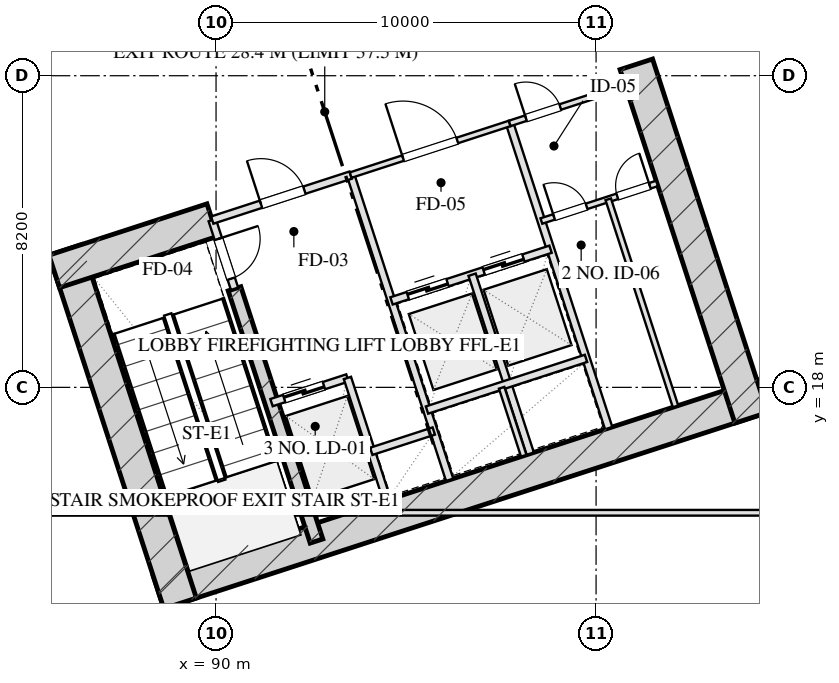
"""IFC4 building model, lengths in metres.
Left out: names, types, materials, properties, quantities, classifications, styles, units other than length and angle.
Written with IfcOpenShell. Run it as: python <this file> out.ifc"""

import sys

from ifc_helpers import new_model, si_unit, direction, frame, frame_2d, origin, place, context, subcontext, project, spatial, rectangle, extrude, element, fill, save


model = new_model("IFC4")
c1 = context("Model", 3, precision=1e-05, world=origin(), true_north=direction((0.0, 1.0)))
c2 = subcontext(c1, "Body", "Model", "MODEL_VIEW")
j1 = project(units=[si_unit("LENGTHUNIT", "METRE"), si_unit("PLANEANGLEUNIT", "RADIAN")], contexts=[c1])
p1 = place(None, origin())
s1 = spatial("IfcSite", under=j1, at=p1, CompositionType="ELEMENT")
p2 = place(p1, origin())
s2 = spatial("IfcBuilding", under=s1, at=p2, CompositionType="ELEMENT")
p3 = place(p2, frame((0.0, 0.0, 6.0)))
s3 = spatial("IfcBuildingStorey", under=s2, at=p3, CompositionType="ELEMENT", Elevation=6.0)
p4 = place(p3, frame((88.487, 12.605, 0.0), z_axis=(0.0, 0.0, 1.0), x_axis=(0.951055016115, 0.309021611416, 0.0)))
e1 = element("IfcWall", 1, at=p4, inside=s3, PredefinedType="SHEAR", context=c2, shape_type="SweptSolid", body=[
    extrude(rectangle(XDim=16.7, YDim=0.9, at=frame_2d((8.35, 0.0))), origin(), (0.0, 0.0, 1.0), 5.5),
])
p5 = place(p3, frame((86.032, 21.618, 0.0), z_axis=(0.0, 0.0, 1.0), x_axis=(0.30901438634, -0.951057363693, 0.0)))
e2 = element("IfcWall", 2, at=p5, inside=s3, PredefinedType="SHEAR", context=c2, shape_type="SweptSolid", body=[
    extrude(rectangle(XDim=9.78, YDim=0.9, at=frame_2d((4.89, 0.0))), origin(), (0.0, 0.0, 1.0), 5.5),
])
p6 = place(p3, frame((101.059, 26.5, 0.0), z_axis=(0.0, 0.0, 1.0), x_axis=(0.309021722829, -0.951054979914, 0.0)))
e3 = element("IfcWall", 3, at=p6, inside=s3, PredefinedType="SHEAR", context=c2, shape_type="SweptSolid", body=[
    extrude(rectangle(XDim=9.78, YDim=0.9, at=frame_2d((4.89, 0.0))), origin(), (0.0, 0.0, 1.0), 5.5),
])
p7 = place(p3, frame((90.486, 20.594, 0.0), z_axis=(0.0, 0.0, 1.0), x_axis=(0.309020428229, -0.951055400562, 0.0)))
e4 = element("IfcWall", 4, at=p7, inside=s3, PredefinedType="SHEAR", context=c2, shape_type="SweptSolid", body=[
    extrude(rectangle(XDim=6.98, YDim=0.35, at=frame_2d((3.49, 0.0))), origin(), (0.0, 0.0, 1.0), 5.5),
])
p8 = place(p3, frame((85.743, 21.051, 0.0), z_axis=(0.0, 0.0, 1.0), x_axis=(0.951063623806, 0.308995118848, 0.0)))
e5 = element("IfcWall", 5, at=p8, inside=s3, PredefinedType="SHEAR", context=c2, shape_type="SweptSolid", body=[
    extrude(rectangle(XDim=4.37, YDim=0.9, at=frame_2d((2.185, 0.0))), origin(), (0.0, 0.0, 1.0), 5.5),
])
p9 = place(p3, frame((89.899, 22.401, 0.0), z_axis=(0.0, 0.0, 1.0), x_axis=(0.308932062672, -0.951084108086, 0.0)))
e6 = element("IfcWall", 6, at=p9, inside=s3, PredefinedType="PARTITIONING", context=c2, shape_type="SweptSolid", body=[
    extrude(rectangle(XDim=1.9, YDim=0.2, at=frame_2d((0.95, 0.0))), origin(), (0.0, 0.0, 1.0), 5.185),
])
p10 = place(p9, frame((0.52, 0.0, 0.0)))
e7 = element("IfcOpeningElement", 7, at=p10, cuts=e6, PredefinedType="OPENING", context=c2, shape_type="SweptSolid", body=[
    extrude(rectangle(XDim=1.1, YDim=2.05, at=frame_2d((0.55, 1.025))), frame((0.0, 0.11, 0.0), z_axis=(0.0, -1.0, 0.0), x_axis=(1.0, 0.0, 0.0)), (0.0, 0.0, 1.0), 0.22),
])
p11 = place(p3, frame((93.542, 23.585, 0.0), z_axis=(0.0, 0.0, 1.0), x_axis=(0.309042196757, -0.951048327176, 0.0)))
e8 = element("IfcWall", 8, at=p11, inside=s3, PredefinedType="PARTITIONING", context=c2, shape_type="SweptSolid", body=[
    extrude(rectangle(XDim=8.43, YDim=0.2, at=frame_2d((4.215, 0.0))), origin(), (0.0, 0.0, 1.0), 5.185),
])
p12 = place(p3, frame((89.899, 22.401, 0.0), z_axis=(0.0, 0.0, 1.0), x_axis=(0.951046716504, 0.309047153403, 0.0)))
e9 = element("IfcWall", 9, at=p12, inside=s3, PredefinedType="PARTITIONING", context=c2, shape_type="SweptSolid", body=[
    extrude(rectangle(XDim=3.83, YDim=0.2, at=frame_2d((1.915, 0.0))), origin(), (0.0, 0.0, 1.0), 5.185),
])
p13 = place(p12, frame((1.35, 0.0, 0.0)))
e10 = element("IfcOpeningElement", 10, at=p13, cuts=e9, PredefinedType="OPENING", context=c2, shape_type="SweptSolid", body=[
    extrude(rectangle(XDim=1.2, YDim=2.05, at=frame_2d((0.6, 1.025))), frame((0.0, 0.11, 0.0), z_axis=(0.0, -1.0, 0.0), x_axis=(1.0, 0.0, 0.0)), (0.0, 0.0, 1.0), 0.22),
])
p14 = place(p3, frame((91.46, 17.598, 0.0), z_axis=(0.0, 0.0, 1.0), x_axis=(0.951062257173, 0.308999325213, 0.0)))
e11 = element("IfcWall", 11, at=p14, inside=s3, PredefinedType="PARTITIONING", context=c2, shape_type="SweptSolid", body=[
    extrude(rectangle(XDim=2.1, YDim=0.2, at=frame_2d((1.05, 0.0))), origin(), (0.0, 0.0, 1.0), 5.185),
])
p15 = place(p14, frame((0.35, 0.0, 0.0)))
e12 = element("IfcOpeningElement", 12, at=p15, cuts=e11, PredefinedType="OPENING", context=c2, shape_type="SweptSolid", body=[
    extrude(rectangle(XDim=1.1, YDim=2.05, at=frame_2d((0.55, 1.025))), frame((0.0, 0.11, 0.0), z_axis=(0.0, -1.0, 0.0), x_axis=(1.0, 0.0, 0.0)), (0.0, 0.0, 1.0), 0.22),
])
p16 = place(p3, frame((93.457, 18.247, 0.0), z_axis=(0.0, 0.0, 1.0), x_axis=(0.3089935693, -0.951064127245, 0.0)))
e13 = element("IfcWall", 13, at=p16, inside=s3, PredefinedType="PARTITIONING", context=c2, shape_type="SweptSolid", body=[
    extrude(rectangle(XDim=3.7, YDim=0.2, at=frame_2d((1.85, 0.0))), origin(), (0.0, 0.0, 1.0), 5.185),
])
p17 = place(p3, frame((94.084, 16.317, 0.0), z_axis=(0.0, 0.0, 1.0), x_axis=(0.951041328149, 0.309063734775, 0.0)))
e14 = element("IfcWall", 14, at=p17, inside=s3, PredefinedType="PARTITIONING", context=c2, shape_type="SweptSolid", body=[
    extrude(rectangle(XDim=1.73, YDim=0.2, at=frame_2d((0.865, 0.0))), origin(), (0.0, 0.0, 1.0), 5.185),
])
p18 = place(p3, frame((97.727, 24.944, 0.0), z_axis=(0.0, 0.0, 1.0), x_axis=(0.309016001439, -0.951056838919, 0.0)))
e15 = element("IfcWall", 15, at=p18, inside=s3, PredefinedType="PARTITIONING", context=c2, shape_type="SweptSolid", body=[
    extrude(rectangle(XDim=8.43, YDim=0.2, at=frame_2d((4.215, 0.0))), origin(), (0.0, 0.0, 1.0), 5.185),
])
p19 = place(p3, frame((93.542, 23.585, 0.0), z_axis=(0.0, 0.0, 1.0), x_axis=(0.951063829732, 0.308994485023, 0.0)))
e16 = element("IfcWall", 16, at=p19, inside=s3, PredefinedType="PARTITIONING", context=c2, shape_type="SweptSolid", body=[
    extrude(rectangle(XDim=4.4, YDim=0.15, at=frame_2d((2.2, 0.0))), origin(), (0.0, 0.0, 1.0), 5.185),
])
p20 = place(p19, frame((1.45, 0.0, 0.0)))
e17 = element("IfcOpeningElement", 17, at=p20, cuts=e16, PredefinedType="OPENING", context=c2, shape_type="SweptSolid", body=[
    extrude(rectangle(XDim=1.5, YDim=2.05, at=frame_2d((0.75, 1.025))), frame((0.0, 0.085, 0.0), z_axis=(0.0, -1.0, 0.0), x_axis=(1.0, 0.0, 0.0)), (0.0, 0.0, 1.0), 0.17),
])
p21 = place(p3, frame((94.617, 20.275, 0.0), z_axis=(0.0, 0.0, 1.0), x_axis=(0.951058531764, 0.30901079133, 0.0)))
e18 = element("IfcWall", 18, at=p21, inside=s3, PredefinedType="PARTITIONING", context=c2, shape_type="SweptSolid", body=[
    extrude(rectangle(XDim=4.4, YDim=0.2, at=frame_2d((2.2, 0.0))), origin(), (0.0, 0.0, 1.0), 5.185),
])
p22 = place(p21, frame((0.45, 0.0, 0.0)))
e19 = element("IfcOpeningElement", 19, at=p22, cuts=e18, PredefinedType="OPENING", context=c2, shape_type="SweptSolid", body=[
    extrude(rectangle(XDim=1.1, YDim=2.05, at=frame_2d((0.55, 1.025))), frame((0.0, 0.11, 0.0), z_axis=(0.0, -1.0, 0.0), x_axis=(1.0, 0.0, 0.0)), (0.0, 0.0, 1.0), 0.22),
])
p23 = place(p21, frame((2.55, 0.0, 0.0)))
e20 = element("IfcOpeningElement", 20, at=p23, cuts=e18, PredefinedType="OPENING", context=c2, shape_type="SweptSolid", body=[
    extrude(rectangle(XDim=1.1, YDim=2.05, at=frame_2d((0.55, 1.025))), frame((0.0, 0.11, 0.0), z_axis=(0.0, -1.0, 0.0), x_axis=(1.0, 0.0, 0.0)), (0.0, 0.0, 1.0), 0.22),
])
p24 = place(p3, frame((96.738, 20.964, 0.0), z_axis=(0.0, 0.0, 1.0), x_axis=(0.309042578481, -0.951048203135, 0.0)))
e21 = element("IfcWall", 21, at=p24, inside=s3, PredefinedType="PARTITIONING", context=c2, shape_type="SweptSolid", body=[
    extrude(rectangle(XDim=4.95, YDim=0.2, at=frame_2d((2.475, 0.0))), origin(), (0.0, 0.0, 1.0), 5.185),
])
p25 = place(p3, frame((95.551, 17.403, 0.0), z_axis=(0.0, 0.0, 1.0), x_axis=(0.951058531764, 0.30901079133, 0.0)))
e22 = element("IfcWall", 22, at=p25, inside=s3, PredefinedType="PARTITIONING", context=c2, shape_type="SweptSolid", body=[
    extrude(rectangle(XDim=4.4, YDim=0.2, at=frame_2d((2.2, 0.0))), origin(), (0.0, 0.0, 1.0), 5.185),
])
p26 = place(p3, frame((97.516, 17.989, 0.0), z_axis=(0.0, 0.0, 1.0), x_axis=(0.30897153969, -0.951071284217, 0.0)))
e23 = element("IfcWall", 23, at=p26, inside=s3, PredefinedType="PARTITIONING", context=c2, shape_type="SweptSolid", body=[
    extrude(rectangle(XDim=1.88, YDim=0.15, at=frame_2d((0.94, 0.0))), origin(), (0.0, 0.0, 1.0), 5.185),
])
p27 = place(p3, frame((97.727, 24.944, 0.0), z_axis=(0.0, 0.0, 1.0), x_axis=(0.951036872128, 0.309077446369, 0.0)))
e24 = element("IfcWall", 24, at=p27, inside=s3, PredefinedType="PARTITIONING", context=c2, shape_type="SweptSolid", body=[
    extrude(rectangle(XDim=3.2, YDim=0.15, at=frame_2d((1.6, 0.0))), origin(), (0.0, 0.0, 1.0), 5.185),
])
p28 = place(p27, frame((0.45, 0.0, 0.0)))
e25 = element("IfcOpeningElement", 25, at=p28, cuts=e24, PredefinedType="OPENING", context=c2, shape_type="SweptSolid", body=[
    extrude(rectangle(XDim=0.95, YDim=2.05, at=frame_2d((0.475, 1.025))), frame((0.0, 0.085, 0.0), z_axis=(0.0, -1.0, 0.0), x_axis=(1.0, 0.0, 0.0)), (0.0, 0.0, 1.0), 0.17),
])
p29 = place(p3, frame((98.561, 22.376, 0.0), z_axis=(0.0, 0.0, 1.0), x_axis=(0.95104415986, 0.309055020985, 0.0)))
e26 = element("IfcWall", 26, at=p29, inside=s3, PredefinedType="PARTITIONING", context=c2, shape_type="SweptSolid", body=[
    extrude(rectangle(XDim=3.2, YDim=0.15, at=frame_2d((1.6, 0.0))), origin(), (0.0, 0.0, 1.0), 5.185),
])
p30 = place(p29, frame((0.35, 0.0, 0.0)))
e27 = element("IfcOpeningElement", 27, at=p30, cuts=e26, PredefinedType="OPENING", context=c2, shape_type="SweptSolid", body=[
    extrude(rectangle(XDim=0.9, YDim=2.05, at=frame_2d((0.45, 1.025))), frame((0.0, 0.085, 0.0), z_axis=(0.0, -1.0, 0.0), x_axis=(1.0, 0.0, 0.0)), (0.0, 0.0, 1.0), 0.17),
])
p31 = place(p29, frame((2.1, 0.0, 0.0)))
e28 = element("IfcOpeningElement", 28, at=p31, cuts=e26, PredefinedType="OPENING", context=c2, shape_type="SweptSolid", body=[
    extrude(rectangle(XDim=0.9, YDim=2.05, at=frame_2d((0.45, 1.025))), frame((0.0, 0.085, 0.0), z_axis=(0.0, -1.0, 0.0), x_axis=(1.0, 0.0, 0.0)), (0.0, 0.0, 1.0), 0.17),
])
p32 = place(p3, frame((100.32, 22.948, 0.0), z_axis=(0.0, 0.0, 1.0), x_axis=(0.309035009867, -0.951050662518, 0.0)))
e29 = element("IfcWall", 29, at=p32, inside=s3, PredefinedType="PARTITIONING", context=c2, shape_type="SweptSolid", body=[
    extrude(rectangle(XDim=5.73, YDim=0.15, at=frame_2d((2.865, 0.0))), origin(), (0.0, 0.0, 1.0), 5.185),
])
p33 = place(p3, frame((18.0, 14.7, 0.0), z_axis=(0.0, 0.0, 1.0), x_axis=(1.0, 0.0, 0.0)))
e30 = element("IfcWall", 30, at=p33, inside=s3, PredefinedType="PARTITIONING", context=c2, shape_type="SweptSolid", body=[
    extrude(rectangle(XDim=88.2, YDim=0.15, at=frame_2d((44.1, 0.0))), origin(), (0.0, 0.0, 1.0), 2.325),
])
p34 = place(p33, frame((21.6, 0.0, 0.0)))
e31 = element("IfcOpeningElement", 31, at=p34, cuts=e30, PredefinedType="OPENING", context=c2, shape_type="SweptSolid", body=[
    extrude(rectangle(XDim=1.5, YDim=2.05, at=frame_2d((0.75, 1.025))), frame((0.0, 0.085, 0.0), z_axis=(0.0, -1.0, 0.0), x_axis=(1.0, 0.0, 0.0)), (0.0, 0.0, 1.0), 0.17),
])
p35 = place(p10, origin())
e32 = element("IfcDoor", 32, at=p35, inside=s3, OperationType="SINGLE_SWING_LEFT", PredefinedType="DOOR", context=c2, shape_type="SweptSolid", body=[
    extrude(rectangle(XDim=1.1, YDim=2.05, at=frame_2d((0.55, 1.025))), frame((0.0, 0.025, 0.0), z_axis=(0.0, -1.0, 0.0), x_axis=(1.0, 0.0, 0.0)), (0.0, 0.0, 1.0), 0.05),
])
fill(e7, e32)
p36 = place(p13, origin())
e33 = element("IfcDoor", 33, at=p36, inside=s3, OperationType="SINGLE_SWING_LEFT", PredefinedType="DOOR", context=c2, shape_type="SweptSolid", body=[
    extrude(rectangle(XDim=1.2, YDim=2.05, at=frame_2d((0.6, 1.025))), frame((0.0, 0.025, 0.0), z_axis=(0.0, -1.0, 0.0), x_axis=(1.0, 0.0, 0.0)), (0.0, 0.0, 1.0), 0.05),
])
fill(e10, e33)
p37 = place(p15, origin())
e34 = element("IfcDoor", 34, at=p37, inside=s3, OperationType="DOUBLE_DOOR_SLIDING", PredefinedType="DOOR", context=c2, shape_type="SweptSolid", body=[
    extrude(rectangle(XDim=1.1, YDim=2.05, at=frame_2d((0.55, 1.025))), frame((0.0, 0.025, 0.0), z_axis=(0.0, -1.0, 0.0), x_axis=(1.0, 0.0, 0.0)), (0.0, 0.0, 1.0), 0.05),
])
fill(e12, e34)
p38 = place(p20, origin())
e35 = element("IfcDoor", 35, at=p38, inside=s3, OperationType="SINGLE_SWING_LEFT", PredefinedType="DOOR", context=c2, shape_type="SweptSolid", body=[
    extrude(rectangle(XDim=1.5, YDim=2.05, at=frame_2d((0.75, 1.025))), frame((0.0, 0.025, 0.0), z_axis=(0.0, -1.0, 0.0), x_axis=(1.0, 0.0, 0.0)), (0.0, 0.0, 1.0), 0.05),
])
fill(e17, e35)
p39 = place(p22, origin())
e36 = element("IfcDoor", 36, at=p39, inside=s3, OperationType="DOUBLE_DOOR_SLIDING", PredefinedType="DOOR", context=c2, shape_type="SweptSolid", body=[
    extrude(rectangle(XDim=1.1, YDim=2.05, at=frame_2d((0.55, 1.025))), frame((0.0, 0.025, 0.0), z_axis=(0.0, -1.0, 0.0), x_axis=(1.0, 0.0, 0.0)), (0.0, 0.0, 1.0), 0.05),
])
fill(e19, e36)
p40 = place(p23, origin())
e37 = element("IfcDoor", 37, at=p40, inside=s3, OperationType="DOUBLE_DOOR_SLIDING", PredefinedType="DOOR", context=c2, shape_type="SweptSolid", body=[
    extrude(rectangle(XDim=1.1, YDim=2.05, at=frame_2d((0.55, 1.025))), frame((0.0, 0.025, 0.0), z_axis=(0.0, -1.0, 0.0), x_axis=(1.0, 0.0, 0.0)), (0.0, 0.0, 1.0), 0.05),
])
fill(e20, e37)
p41 = place(p28, origin())
e38 = element("IfcDoor", 38, at=p41, inside=s3, OperationType="SINGLE_SWING_LEFT", PredefinedType="DOOR", context=c2, shape_type="SweptSolid", body=[
    extrude(rectangle(XDim=0.95, YDim=2.05, at=frame_2d((0.475, 1.025))), frame((0.0, 0.025, 0.0), z_axis=(0.0, -1.0, 0.0), x_axis=(1.0, 0.0, 0.0)), (0.0, 0.0, 1.0), 0.05),
])
fill(e25, e38)
p42 = place(p30, origin())
e39 = element("IfcDoor", 39, at=p42, inside=s3, OperationType="SINGLE_SWING_LEFT", PredefinedType="DOOR", context=c2, shape_type="SweptSolid", body=[
    extrude(rectangle(XDim=0.9, YDim=2.05, at=frame_2d((0.45, 1.025))), frame((0.0, 0.025, 0.0), z_axis=(0.0, -1.0, 0.0), x_axis=(1.0, 0.0, 0.0)), (0.0, 0.0, 1.0), 0.05),
])
fill(e27, e39)
p43 = place(p31, origin())
e40 = element("IfcDoor", 40, at=p43, inside=s3, OperationType="SINGLE_SWING_RIGHT", PredefinedType="DOOR", context=c2, shape_type="SweptSolid", body=[
    extrude(rectangle(XDim=0.9, YDim=2.05, at=frame_2d((0.45, 1.025))), frame((0.0, 0.025, 0.0), z_axis=(0.0, -1.0, 0.0), x_axis=(1.0, 0.0, 0.0)), (0.0, 0.0, 1.0), 0.05),
])
fill(e28, e40)
save(model, sys.argv[1])
